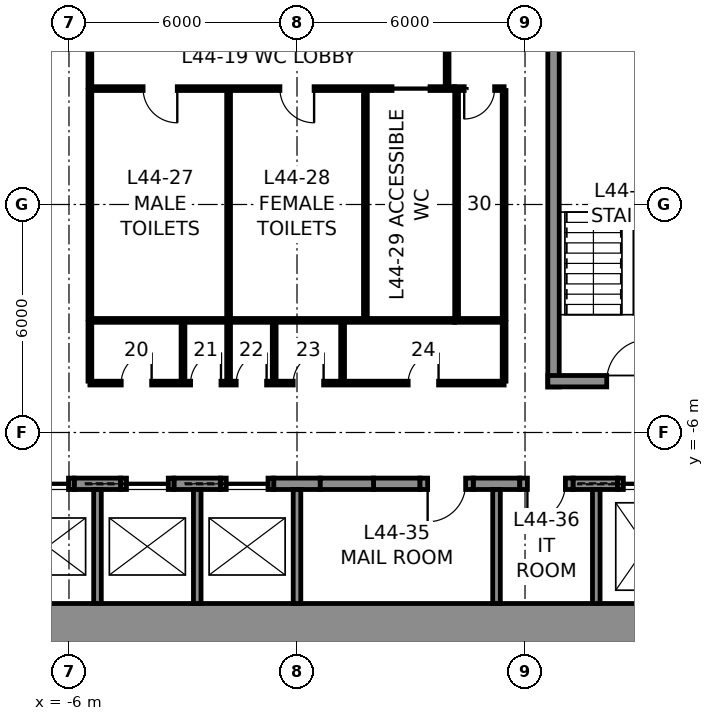
"""IFC4 building model, lengths in metres.
Left out: names, types, materials, properties, quantities, classifications, styles, units other than length and angle.
Written with IfcOpenShell. Run it as: python <this file> out.ifc"""

import sys

from ifc_helpers import new_model, si_unit, direction, frame, frame_2d, origin, place, context, subcontext, project, spatial, rectangle, extrude, element, fill, save


model = new_model("IFC4")
c1 = context("Model", 3, precision=1e-05, world=origin(), true_north=direction((0.0, 1.0)))
c2 = subcontext(c1, "Body", "Model", "MODEL_VIEW")
j1 = project(units=[si_unit("LENGTHUNIT", "METRE"), si_unit("PLANEANGLEUNIT", "RADIAN")], contexts=[c1])
p1 = place(None, origin())
s1 = spatial("IfcSite", under=j1, at=p1, CompositionType="ELEMENT")
p2 = place(p1, origin())
s2 = spatial("IfcBuilding", under=s1, at=p2, CompositionType="ELEMENT")
p3 = place(p2, frame((0.0, 0.0, 205.8)))
s3 = spatial("IfcBuildingStorey", under=s2, at=p3, CompositionType="ELEMENT", Elevation=205.8)
p4 = place(p3, frame((12.0, -11.25, 0.0), z_axis=(0.0, 0.0, 1.0), x_axis=(-1.0, 0.0, 0.0)))
e1 = element("IfcWall", 1, at=p4, inside=s3, PredefinedType="SHEAR", context=c2, shape_type="SweptSolid", body=[
    extrude(rectangle(XDim=24.0, YDim=1.5, at=frame_2d((12.0, 0.0))), origin(), (0.0, 0.0, 1.0), 4.0),
])
for number, where, z_axis, x_axis in (
    (2, (-5.863, -7.35, 0.0), (0.0, 0.0, 1.0), (1.0, 0.0, 0.0)),
    (3, (-3.238, -7.35, 0.0), (0.0, 0.0, 1.0), (1.0, 0.0, 0.0)),
    (4, (-0.613, -7.35, 0.0), (0.0, 0.0, 1.0), (1.0, 0.0, 0.0)),
    (5, (2.012, -7.35, 0.0), (0.0, 0.0, 1.0), (1.0, 0.0, 0.0)),
    (6, (4.637, -7.35, 0.0), (0.0, 0.0, 1.0), (1.0, 0.0, 0.0)),
):
    element("IfcWall", number, at=place(p3, frame(where, z_axis=z_axis, x_axis=x_axis)), inside=s3, PredefinedType="SHEAR", context=c2, shape_type="SweptSolid", body=[
        extrude(rectangle(XDim=1.225, YDim=0.3, at=frame_2d((0.613, 0.0))), origin(), (0.0, 0.0, 1.0), 4.0),
    ])
p5 = place(p3, frame((7.262, -7.35, 0.0), z_axis=(0.0, 0.0, 1.0), x_axis=(1.0, 0.0, 0.0)))
e7 = element("IfcWall", 7, at=p5, inside=s3, PredefinedType="SHEAR", context=c2, shape_type="SweptSolid", body=[
    extrude(rectangle(XDim=1.175, YDim=0.3, at=frame_2d((0.587, 0.0))), origin(), (0.0, 0.0, 1.0), 4.0),
])
p6 = place(p3, frame((-7.262, -7.35, 0.0), z_axis=(0.0, 0.0, 1.0), x_axis=(1.0, 0.0, 0.0)))
e8 = element("IfcWall", 8, at=p6, inside=s3, PredefinedType="PARTITIONING", context=c2, shape_type="SweptSolid", body=[
    extrude(rectangle(XDim=1.4, YDim=0.3, at=frame_2d((0.7, 0.0))), origin(), (0.0, 0.0, 1.0), 4.0),
])
p7 = place(p6, frame((0.15, 0.0, 0.0)))
e9 = element("IfcOpeningElement", 9, at=p7, cuts=e8, PredefinedType="OPENING", context=c2, shape_type="SweptSolid", body=[
    extrude(rectangle(XDim=1.1, YDim=2.3, at=frame_2d((0.55, 1.15))), frame((0.0, 0.16, 0.0), z_axis=(0.0, -1.0, 0.0), x_axis=(1.0, 0.0, 0.0)), (0.0, 0.0, 1.0), 0.32),
])
p8 = place(p3, frame((-4.637, -7.35, 0.0), z_axis=(0.0, 0.0, 1.0), x_axis=(1.0, 0.0, 0.0)))
e10 = element("IfcWall", 10, at=p8, inside=s3, PredefinedType="PARTITIONING", context=c2, shape_type="SweptSolid", body=[
    extrude(rectangle(XDim=1.4, YDim=0.3, at=frame_2d((0.7, 0.0))), origin(), (0.0, 0.0, 1.0), 4.0),
])
p9 = place(p8, frame((0.15, 0.0, 0.0)))
e11 = element("IfcOpeningElement", 11, at=p9, cuts=e10, PredefinedType="OPENING", context=c2, shape_type="SweptSolid", body=[
    extrude(rectangle(XDim=1.1, YDim=2.3, at=frame_2d((0.55, 1.15))), frame((0.0, 0.16, 0.0), z_axis=(0.0, -1.0, 0.0), x_axis=(1.0, 0.0, 0.0)), (0.0, 0.0, 1.0), 0.32),
])
p10 = place(p3, frame((-2.012, -7.35, 0.0), z_axis=(0.0, 0.0, 1.0), x_axis=(1.0, 0.0, 0.0)))
e12 = element("IfcWall", 12, at=p10, inside=s3, PredefinedType="PARTITIONING", context=c2, shape_type="SweptSolid", body=[
    extrude(rectangle(XDim=1.4, YDim=0.3, at=frame_2d((0.7, 0.0))), origin(), (0.0, 0.0, 1.0), 4.0),
])
p11 = place(p10, frame((0.15, 0.0, 0.0)))
e13 = element("IfcOpeningElement", 13, at=p11, cuts=e12, PredefinedType="OPENING", context=c2, shape_type="SweptSolid", body=[
    extrude(rectangle(XDim=1.1, YDim=2.3, at=frame_2d((0.55, 1.15))), frame((0.0, 0.16, 0.0), z_axis=(0.0, -1.0, 0.0), x_axis=(1.0, 0.0, 0.0)), (0.0, 0.0, 1.0), 0.32),
])
p12 = place(p3, frame((0.613, -7.35, 0.0), z_axis=(0.0, 0.0, 1.0), x_axis=(1.0, 0.0, 0.0)))
e14 = element("IfcWall", 14, at=p12, inside=s3, PredefinedType="PARTITIONING", context=c2, shape_type="SweptSolid", body=[
    extrude(rectangle(XDim=1.4, YDim=0.3, at=frame_2d((0.7, 0.0))), origin(), (0.0, 0.0, 1.0), 4.0),
])
p13 = place(p3, frame((3.238, -7.35, 0.0), z_axis=(0.0, 0.0, 1.0), x_axis=(1.0, 0.0, 0.0)))
e15 = element("IfcWall", 15, at=p13, inside=s3, PredefinedType="PARTITIONING", context=c2, shape_type="SweptSolid", body=[
    extrude(rectangle(XDim=1.4, YDim=0.3, at=frame_2d((0.7, 0.0))), origin(), (0.0, 0.0, 1.0), 4.0),
])
p14 = place(p13, frame((0.2, 0.0, 0.0)))
e16 = element("IfcOpeningElement", 16, at=p14, cuts=e15, PredefinedType="OPENING", context=c2, shape_type="SweptSolid", body=[
    extrude(rectangle(XDim=1.0, YDim=2.3, at=frame_2d((0.5, 1.15))), frame((0.0, 0.16, 0.0), z_axis=(0.0, -1.0, 0.0), x_axis=(1.0, 0.0, 0.0)), (0.0, 0.0, 1.0), 0.32),
])
p15 = place(p3, frame((5.863, -7.35, 0.0), z_axis=(0.0, 0.0, 1.0), x_axis=(1.0, 0.0, 0.0)))
e17 = element("IfcWall", 17, at=p15, inside=s3, PredefinedType="PARTITIONING", context=c2, shape_type="SweptSolid", body=[
    extrude(rectangle(XDim=1.4, YDim=0.3, at=frame_2d((0.7, 0.0))), origin(), (0.0, 0.0, 1.0), 4.0),
])
p16 = place(p15, frame((0.2, 0.0, 0.0)))
e18 = element("IfcOpeningElement", 18, at=p16, cuts=e17, PredefinedType="OPENING", context=c2, shape_type="SweptSolid", body=[
    extrude(rectangle(XDim=1.0, YDim=2.3, at=frame_2d((0.5, 1.15))), frame((0.0, 0.16, 0.0), z_axis=(0.0, -1.0, 0.0), x_axis=(1.0, 0.0, 0.0)), (0.0, 0.0, 1.0), 0.32),
])
p17 = place(p3, frame((8.438, -7.35, 0.0), z_axis=(0.0, 0.0, 1.0), x_axis=(1.0, 0.0, 0.0)))
e19 = element("IfcWall", 19, at=p17, inside=s3, PredefinedType="PARTITIONING", context=c2, shape_type="SweptSolid", body=[
    extrude(rectangle(XDim=1.5, YDim=0.3, at=frame_2d((0.75, 0.0))), origin(), (0.0, 0.0, 1.0), 4.0),
])
p18 = place(p17, frame((0.15, 0.0, 0.0)))
e20 = element("IfcOpeningElement", 20, at=p18, cuts=e19, PredefinedType="OPENING", context=c2, shape_type="SweptSolid", body=[
    extrude(rectangle(XDim=1.2, YDim=2.3, at=frame_2d((0.6, 1.15))), frame((0.0, 0.16, 0.0), z_axis=(0.0, -1.0, 0.0), x_axis=(1.0, 0.0, 0.0)), (0.0, 0.0, 1.0), 0.32),
])
for number, where, z_axis, x_axis in (
    (21, (-5.25, -10.5, 0.0), (0.0, 0.0, 1.0), (0.0, 1.0, 0.0)),
    (22, (-2.625, -10.5, 0.0), (0.0, 0.0, 1.0), (0.0, 1.0, 0.0)),
    (23, (0.0, -10.5, 0.0), (0.0, 0.0, 1.0), (0.0, 1.0, 0.0)),
    (24, (5.25, -10.5, 0.0), (0.0, 0.0, 1.0), (0.0, 1.0, 0.0)),
    (25, (7.875, -10.5, 0.0), (0.0, 0.0, 1.0), (0.0, 1.0, 0.0)),
):
    element("IfcWall", number, at=place(p3, frame(where, z_axis=z_axis, x_axis=x_axis)), inside=s3, PredefinedType="PARTITIONING", context=c2, shape_type="SweptSolid", body=[
        extrude(rectangle(XDim=3.0, YDim=0.2, at=frame_2d((1.5, 0.0))), origin(), (0.0, 0.0, 1.0), 4.0),
    ])
p19 = place(p3, frame((6.75, -4.8, 0.0), z_axis=(0.0, 0.0, 1.0), x_axis=(0.0, 1.0, 0.0)))
e26 = element("IfcWall", 26, at=p19, inside=s3, PredefinedType="SOLIDWALL", context=c2, shape_type="SweptSolid", body=[
    extrude(rectangle(XDim=9.6, YDim=0.3, at=frame_2d((4.8, 0.0))), origin(), (0.0, 0.0, 1.0), 3.75),
])
p20 = place(p3, frame((10.5, -4.65, 0.0), z_axis=(0.0, 0.0, 1.0), x_axis=(-1.0, 0.0, 0.0)))
e27 = element("IfcWall", 27, at=p20, inside=s3, PredefinedType="SOLIDWALL", context=c2, shape_type="SweptSolid", body=[
    extrude(rectangle(XDim=3.9, YDim=0.3, at=frame_2d((1.95, 0.0))), origin(), (0.0, 0.0, 1.0), 3.75),
])
p21 = place(p20, frame((1.25, 0.0, 0.0)))
e28 = element("IfcOpeningElement", 28, at=p21, cuts=e27, PredefinedType="OPENING", context=c2, shape_type="SweptSolid", body=[
    extrude(rectangle(XDim=1.1, YDim=2.3, at=frame_2d((0.55, 1.15))), frame((0.0, 0.16, 0.0), z_axis=(0.0, -1.0, 0.0), x_axis=(1.0, 0.0, 0.0)), (0.0, 0.0, 1.0), 0.32),
])
p22 = place(p3, frame((-5.45, 3.05, 0.0), z_axis=(0.0, 0.0, 1.0), x_axis=(1.0, 0.0, 0.0)))
e29 = element("IfcWall", 29, at=p22, inside=s3, PredefinedType="PARTITIONING", context=c2, shape_type="SweptSolid", body=[
    extrude(rectangle(XDim=9.6, YDim=0.1, at=frame_2d((4.8, 0.0))), origin(), (0.0, 0.0, 1.0), 3.75),
])
p23 = place(p22, frame((1.4, 0.0, 0.0)))
e30 = element("IfcOpeningElement", 30, at=p23, cuts=e29, PredefinedType="OPENING", context=c2, shape_type="SweptSolid", body=[
    extrude(rectangle(XDim=0.9, YDim=2.3, at=frame_2d((0.45, 1.15))), frame((0.0, 0.06, 0.0), z_axis=(0.0, -1.0, 0.0), x_axis=(1.0, 0.0, 0.0)), (0.0, 0.0, 1.0), 0.12),
])
p24 = place(p22, frame((5.0, 0.0, 0.0)))
e31 = element("IfcOpeningElement", 31, at=p24, cuts=e29, PredefinedType="OPENING", context=c2, shape_type="SweptSolid", body=[
    extrude(rectangle(XDim=0.9, YDim=2.3, at=frame_2d((0.45, 1.15))), frame((0.0, 0.06, 0.0), z_axis=(0.0, -1.0, 0.0), x_axis=(1.0, 0.0, 0.0)), (0.0, 0.0, 1.0), 0.12),
])
p25 = place(p22, frame((7.95, 0.0, 0.0)))
e32 = element("IfcOpeningElement", 32, at=p25, cuts=e29, PredefinedType="OPENING", context=c2, shape_type="SweptSolid", body=[
    extrude(rectangle(XDim=1.0, YDim=2.3, at=frame_2d((0.5, 1.15))), frame((0.0, 0.06, 0.0), z_axis=(0.0, -1.0, 0.0), x_axis=(1.0, 0.0, 0.0)), (0.0, 0.0, 1.0), 0.12),
])
p26 = place(p3, frame((4.15, 3.05, 0.0), z_axis=(0.0, 0.0, 1.0), x_axis=(1.0, 0.0, 0.0)))
e33 = element("IfcWall", 33, at=p26, inside=s3, PredefinedType="PARTITIONING", context=c2, shape_type="SweptSolid", body=[
    extrude(rectangle(XDim=1.3, YDim=0.1, at=frame_2d((0.65, 0.0))), origin(), (0.0, 0.0, 1.0), 3.75),
])
p27 = place(p26, frame((0.25, 0.0, 0.0)))
e34 = element("IfcOpeningElement", 34, at=p27, cuts=e33, PredefinedType="OPENING", context=c2, shape_type="SweptSolid", body=[
    extrude(rectangle(XDim=0.8, YDim=2.3, at=frame_2d((0.4, 1.15))), frame((0.0, 0.06, 0.0), z_axis=(0.0, -1.0, 0.0), x_axis=(1.0, 0.0, 0.0)), (0.0, 0.0, 1.0), 0.12),
])
p28 = place(p3, frame((4.15, -3.05, 0.0), z_axis=(0.0, 0.0, 1.0), x_axis=(-1.0, 0.0, 0.0)))
e35 = element("IfcWall", 35, at=p28, inside=s3, PredefinedType="PARTITIONING", context=c2, shape_type="SweptSolid", body=[
    extrude(rectangle(XDim=9.6, YDim=0.1, at=frame_2d((4.8, 0.0))), origin(), (0.0, 0.0, 1.0), 3.75),
])
p29 = place(p3, frame((5.45, -3.05, 0.0), z_axis=(0.0, 0.0, 1.0), x_axis=(-1.0, 0.0, 0.0)))
e36 = element("IfcWall", 36, at=p29, inside=s3, PredefinedType="PARTITIONING", context=c2, shape_type="SweptSolid", body=[
    extrude(rectangle(XDim=1.3, YDim=0.1, at=frame_2d((0.65, 0.0))), origin(), (0.0, 0.0, 1.0), 3.75),
])
for number, where, z_axis, x_axis in (
    (37, (5.45, 3.0, 0.0), (0.0, 0.0, 1.0), (0.0, -1.0, 0.0)),
    (38, (-5.45, -3.0, 0.0), (0.0, 0.0, 1.0), (0.0, 1.0, 0.0)),
    (39, (-1.8, -3.0, 0.0), (0.0, 0.0, 1.0), (0.0, 1.0, 0.0)),
    (40, (1.8, -3.0, 0.0), (0.0, 0.0, 1.0), (0.0, 1.0, 0.0)),
    (41, (4.2, -3.0, 0.0), (0.0, 0.0, 1.0), (0.0, 1.0, 0.0)),
):
    element("IfcWall", number, at=place(p3, frame(where, z_axis=z_axis, x_axis=x_axis)), inside=s3, PredefinedType="PARTITIONING", context=c2, shape_type="SweptSolid", body=[
        extrude(rectangle(XDim=6.0, YDim=0.1, at=frame_2d((3.0, 0.0))), origin(), (0.0, 0.0, 1.0), 3.75),
    ])
for number, where, z_axis, x_axis in (
    (42, (-5.45, 3.1, 0.0), (0.0, 0.0, 1.0), (0.0, 1.0, 0.0)),
    (43, (3.95, 3.1, 0.0), (0.0, 0.0, 1.0), (0.0, 1.0, 0.0)),
):
    element("IfcWall", number, at=place(p3, frame(where, z_axis=z_axis, x_axis=x_axis)), inside=s3, PredefinedType="PARTITIONING", context=c2, shape_type="SweptSolid", body=[
        extrude(rectangle(XDim=1.55, YDim=0.1, at=frame_2d((0.775, 0.0))), origin(), (0.0, 0.0, 1.0), 3.75),
    ])
p30 = place(p3, frame((5.45, -4.7, 0.0), z_axis=(0.0, 0.0, 1.0), x_axis=(-1.0, 0.0, 0.0)))
e44 = element("IfcWall", 44, at=p30, inside=s3, PredefinedType="PARTITIONING", context=c2, shape_type="SweptSolid", body=[
    extrude(rectangle(XDim=10.9, YDim=0.1, at=frame_2d((5.45, 0.0))), origin(), (0.0, 0.0, 1.0), 3.75),
])
p31 = place(p30, frame((9.275, 0.0, 0.0)))
e45 = element("IfcOpeningElement", 45, at=p31, cuts=e44, PredefinedType="OPENING", context=c2, shape_type="SweptSolid", body=[
    extrude(rectangle(XDim=0.8, YDim=2.3, at=frame_2d((0.4, 1.15))), frame((0.0, 0.06, 0.0), z_axis=(0.0, -1.0, 0.0), x_axis=(1.0, 0.0, 0.0)), (0.0, 0.0, 1.0), 0.12),
])
p32 = place(p30, frame((7.45, 0.0, 0.0)))
e46 = element("IfcOpeningElement", 46, at=p32, cuts=e44, PredefinedType="OPENING", context=c2, shape_type="SweptSolid", body=[
    extrude(rectangle(XDim=0.8, YDim=2.3, at=frame_2d((0.4, 1.15))), frame((0.0, 0.06, 0.0), z_axis=(0.0, -1.0, 0.0), x_axis=(1.0, 0.0, 0.0)), (0.0, 0.0, 1.0), 0.12),
])
p33 = place(p30, frame((6.25, 0.0, 0.0)))
e47 = element("IfcOpeningElement", 47, at=p33, cuts=e44, PredefinedType="OPENING", context=c2, shape_type="SweptSolid", body=[
    extrude(rectangle(XDim=0.8, YDim=2.3, at=frame_2d((0.4, 1.15))), frame((0.0, 0.06, 0.0), z_axis=(0.0, -1.0, 0.0), x_axis=(1.0, 0.0, 0.0)), (0.0, 0.0, 1.0), 0.12),
])
p34 = place(p30, frame((4.75, 0.0, 0.0)))
e48 = element("IfcOpeningElement", 48, at=p34, cuts=e44, PredefinedType="OPENING", context=c2, shape_type="SweptSolid", body=[
    extrude(rectangle(XDim=0.8, YDim=2.3, at=frame_2d((0.4, 1.15))), frame((0.0, 0.06, 0.0), z_axis=(0.0, -1.0, 0.0), x_axis=(1.0, 0.0, 0.0)), (0.0, 0.0, 1.0), 0.12),
])
p35 = place(p30, frame((1.725, 0.0, 0.0)))
e49 = element("IfcOpeningElement", 49, at=p35, cuts=e44, PredefinedType="OPENING", context=c2, shape_type="SweptSolid", body=[
    extrude(rectangle(XDim=0.8, YDim=2.3, at=frame_2d((0.4, 1.15))), frame((0.0, 0.06, 0.0), z_axis=(0.0, -1.0, 0.0), x_axis=(1.0, 0.0, 0.0)), (0.0, 0.0, 1.0), 0.12),
])
for number, where, z_axis, x_axis in (
    (50, (-5.45, -3.1, 0.0), (0.0, 0.0, 1.0), (0.0, -1.0, 0.0)),
    (51, (5.45, -3.1, 0.0), (0.0, 0.0, 1.0), (0.0, -1.0, 0.0)),
    (52, (-3.0, -3.1, 0.0), (0.0, 0.0, 1.0), (0.0, -1.0, 0.0)),
    (53, (-1.8, -3.1, 0.0), (0.0, 0.0, 1.0), (0.0, -1.0, 0.0)),
    (54, (-0.6, -3.1, 0.0), (0.0, 0.0, 1.0), (0.0, -1.0, 0.0)),
    (55, (1.2, -3.1, 0.0), (0.0, 0.0, 1.0), (0.0, -1.0, 0.0)),
):
    element("IfcWall", number, at=place(p3, frame(where, z_axis=z_axis, x_axis=x_axis)), inside=s3, PredefinedType="PARTITIONING", context=c2, shape_type="SweptSolid", body=[
        extrude(rectangle(XDim=1.55, YDim=0.1, at=frame_2d((0.775, 0.0))), origin(), (0.0, 0.0, 1.0), 3.75),
    ])
p36 = place(p21, frame((1.1, 0.0, 0.0), z_axis=(0.0, 0.0, 1.0), x_axis=(-1.0, 0.0, 0.0)))
e56 = element("IfcDoor", 56, at=p36, inside=s3, OperationType="SINGLE_SWING_RIGHT", PredefinedType="DOOR", context=c2, shape_type="SweptSolid", body=[
    extrude(rectangle(XDim=1.1, YDim=2.3, at=frame_2d((0.55, 1.15))), frame((0.0, 0.025, 0.0), z_axis=(0.0, -1.0, 0.0), x_axis=(1.0, 0.0, 0.0)), (0.0, 0.0, 1.0), 0.05),
])
fill(e28, e56)
p37 = place(p23, frame((0.9, 0.0, 0.0), z_axis=(0.0, 0.0, 1.0), x_axis=(-1.0, 0.0, 0.0)))
e57 = element("IfcDoor", 57, at=p37, inside=s3, OperationType="SINGLE_SWING_LEFT", PredefinedType="DOOR", context=c2, shape_type="SweptSolid", body=[
    extrude(rectangle(XDim=0.9, YDim=2.3, at=frame_2d((0.45, 1.15))), frame((0.0, 0.025, 0.0), z_axis=(0.0, -1.0, 0.0), x_axis=(1.0, 0.0, 0.0)), (0.0, 0.0, 1.0), 0.05),
])
fill(e30, e57)
p38 = place(p24, frame((0.9, 0.0, 0.0), z_axis=(0.0, 0.0, 1.0), x_axis=(-1.0, 0.0, 0.0)))
e58 = element("IfcDoor", 58, at=p38, inside=s3, OperationType="SINGLE_SWING_LEFT", PredefinedType="DOOR", context=c2, shape_type="SweptSolid", body=[
    extrude(rectangle(XDim=0.9, YDim=2.3, at=frame_2d((0.45, 1.15))), frame((0.0, 0.025, 0.0), z_axis=(0.0, -1.0, 0.0), x_axis=(1.0, 0.0, 0.0)), (0.0, 0.0, 1.0), 0.05),
])
fill(e31, e58)
p39 = place(p25, frame((1.0, 0.0, 0.0), z_axis=(0.0, 0.0, 1.0), x_axis=(-1.0, 0.0, 0.0)))
e59 = element("IfcDoor", 59, at=p39, inside=s3, OperationType="SLIDING_TO_LEFT", PredefinedType="DOOR", context=c2, shape_type="SweptSolid", body=[
    extrude(rectangle(XDim=1.0, YDim=2.3, at=frame_2d((0.5, 1.15))), frame((0.0, 0.025, 0.0), z_axis=(0.0, -1.0, 0.0), x_axis=(1.0, 0.0, 0.0)), (0.0, 0.0, 1.0), 0.05),
])
fill(e32, e59)
p40 = place(p27, frame((0.8, 0.0, 0.0), z_axis=(0.0, 0.0, 1.0), x_axis=(-1.0, 0.0, 0.0)))
e60 = element("IfcDoor", 60, at=p40, inside=s3, OperationType="SINGLE_SWING_RIGHT", PredefinedType="DOOR", context=c2, shape_type="SweptSolid", body=[
    extrude(rectangle(XDim=0.8, YDim=2.3, at=frame_2d((0.4, 1.15))), frame((0.0, 0.025, 0.0), z_axis=(0.0, -1.0, 0.0), x_axis=(1.0, 0.0, 0.0)), (0.0, 0.0, 1.0), 0.05),
])
fill(e34, e60)
p41 = place(p31, frame((0.8, 0.0, 0.0), z_axis=(0.0, 0.0, 1.0), x_axis=(-1.0, 0.0, 0.0)))
e61 = element("IfcDoor", 61, at=p41, inside=s3, OperationType="SINGLE_SWING_RIGHT", PredefinedType="DOOR", context=c2, shape_type="SweptSolid", body=[
    extrude(rectangle(XDim=0.8, YDim=2.3, at=frame_2d((0.4, 1.15))), frame((0.0, 0.025, 0.0), z_axis=(0.0, -1.0, 0.0), x_axis=(1.0, 0.0, 0.0)), (0.0, 0.0, 1.0), 0.05),
])
fill(e45, e61)
p42 = place(p32, frame((0.8, 0.0, 0.0), z_axis=(0.0, 0.0, 1.0), x_axis=(-1.0, 0.0, 0.0)))
e62 = element("IfcDoor", 62, at=p42, inside=s3, OperationType="SINGLE_SWING_RIGHT", PredefinedType="DOOR", context=c2, shape_type="SweptSolid", body=[
    extrude(rectangle(XDim=0.8, YDim=2.3, at=frame_2d((0.4, 1.15))), frame((0.0, 0.025, 0.0), z_axis=(0.0, -1.0, 0.0), x_axis=(1.0, 0.0, 0.0)), (0.0, 0.0, 1.0), 0.05),
])
fill(e46, e62)
p43 = place(p33, frame((0.8, 0.0, 0.0), z_axis=(0.0, 0.0, 1.0), x_axis=(-1.0, 0.0, 0.0)))
e63 = element("IfcDoor", 63, at=p43, inside=s3, OperationType="SINGLE_SWING_RIGHT", PredefinedType="DOOR", context=c2, shape_type="SweptSolid", body=[
    extrude(rectangle(XDim=0.8, YDim=2.3, at=frame_2d((0.4, 1.15))), frame((0.0, 0.025, 0.0), z_axis=(0.0, -1.0, 0.0), x_axis=(1.0, 0.0, 0.0)), (0.0, 0.0, 1.0), 0.05),
])
fill(e47, e63)
p44 = place(p34, frame((0.8, 0.0, 0.0), z_axis=(0.0, 0.0, 1.0), x_axis=(-1.0, 0.0, 0.0)))
e64 = element("IfcDoor", 64, at=p44, inside=s3, OperationType="SINGLE_SWING_RIGHT", PredefinedType="DOOR", context=c2, shape_type="SweptSolid", body=[
    extrude(rectangle(XDim=0.8, YDim=2.3, at=frame_2d((0.4, 1.15))), frame((0.0, 0.025, 0.0), z_axis=(0.0, -1.0, 0.0), x_axis=(1.0, 0.0, 0.0)), (0.0, 0.0, 1.0), 0.05),
])
fill(e48, e64)
p45 = place(p35, frame((0.8, 0.0, 0.0), z_axis=(0.0, 0.0, 1.0), x_axis=(-1.0, 0.0, 0.0)))
e65 = element("IfcDoor", 65, at=p45, inside=s3, OperationType="SINGLE_SWING_RIGHT", PredefinedType="DOOR", context=c2, shape_type="SweptSolid", body=[
    extrude(rectangle(XDim=0.8, YDim=2.3, at=frame_2d((0.4, 1.15))), frame((0.0, 0.025, 0.0), z_axis=(0.0, -1.0, 0.0), x_axis=(1.0, 0.0, 0.0)), (0.0, 0.0, 1.0), 0.05),
])
fill(e49, e65)
p46 = place(p14, frame((1.0, 0.0, 0.0), z_axis=(0.0, 0.0, 1.0), x_axis=(-1.0, 0.0, 0.0)))
e66 = element("IfcDoor", 66, at=p46, inside=s3, OperationType="SINGLE_SWING_RIGHT", PredefinedType="DOOR", context=c2, shape_type="SweptSolid", body=[
    extrude(rectangle(XDim=1.0, YDim=2.3, at=frame_2d((0.5, 1.15))), frame((0.0, 0.025, 0.0), z_axis=(0.0, -1.0, 0.0), x_axis=(1.0, 0.0, 0.0)), (0.0, 0.0, 1.0), 0.05),
])
fill(e16, e66)
p47 = place(p16, frame((1.0, 0.0, 0.0), z_axis=(0.0, 0.0, 1.0), x_axis=(-1.0, 0.0, 0.0)))
e67 = element("IfcDoor", 67, at=p47, inside=s3, OperationType="SINGLE_SWING_RIGHT", PredefinedType="DOOR", context=c2, shape_type="SweptSolid", body=[
    extrude(rectangle(XDim=1.0, YDim=2.3, at=frame_2d((0.5, 1.15))), frame((0.0, 0.025, 0.0), z_axis=(0.0, -1.0, 0.0), x_axis=(1.0, 0.0, 0.0)), (0.0, 0.0, 1.0), 0.05),
])
fill(e18, e67)
p48 = place(p18, origin())
e68 = element("IfcDoor", 68, at=p48, inside=s3, OperationType="SLIDING_TO_LEFT", PredefinedType="DOOR", context=c2, shape_type="SweptSolid", body=[
    extrude(rectangle(XDim=1.2, YDim=2.3, at=frame_2d((0.6, 1.15))), frame((0.0, 0.025, 0.0), z_axis=(0.0, -1.0, 0.0), x_axis=(1.0, 0.0, 0.0)), (0.0, 0.0, 1.0), 0.05),
])
fill(e20, e68)
p49 = place(p11, origin())
e69 = element("IfcDoor", 69, at=p49, inside=s3, OperationType="SLIDING_TO_LEFT", PredefinedType="DOOR", context=c2, shape_type="SweptSolid", body=[
    extrude(rectangle(XDim=1.1, YDim=2.3, at=frame_2d((0.55, 1.15))), frame((0.0, 0.025, 0.0), z_axis=(0.0, -1.0, 0.0), x_axis=(1.0, 0.0, 0.0)), (0.0, 0.0, 1.0), 0.05),
])
fill(e13, e69)
p50 = place(p9, origin())
e70 = element("IfcDoor", 70, at=p50, inside=s3, OperationType="SLIDING_TO_LEFT", PredefinedType="DOOR", context=c2, shape_type="SweptSolid", body=[
    extrude(rectangle(XDim=1.1, YDim=2.3, at=frame_2d((0.55, 1.15))), frame((0.0, 0.025, 0.0), z_axis=(0.0, -1.0, 0.0), x_axis=(1.0, 0.0, 0.0)), (0.0, 0.0, 1.0), 0.05),
])
fill(e11, e70)
p51 = place(p7, origin())
e71 = element("IfcDoor", 71, at=p51, inside=s3, OperationType="SLIDING_TO_LEFT", PredefinedType="DOOR", context=c2, shape_type="SweptSolid", body=[
    extrude(rectangle(XDim=1.1, YDim=2.3, at=frame_2d((0.55, 1.15))), frame((0.0, 0.025, 0.0), z_axis=(0.0, -1.0, 0.0), x_axis=(1.0, 0.0, 0.0)), (0.0, 0.0, 1.0), 0.05),
])
fill(e9, e71)
save(model, sys.argv[1])
